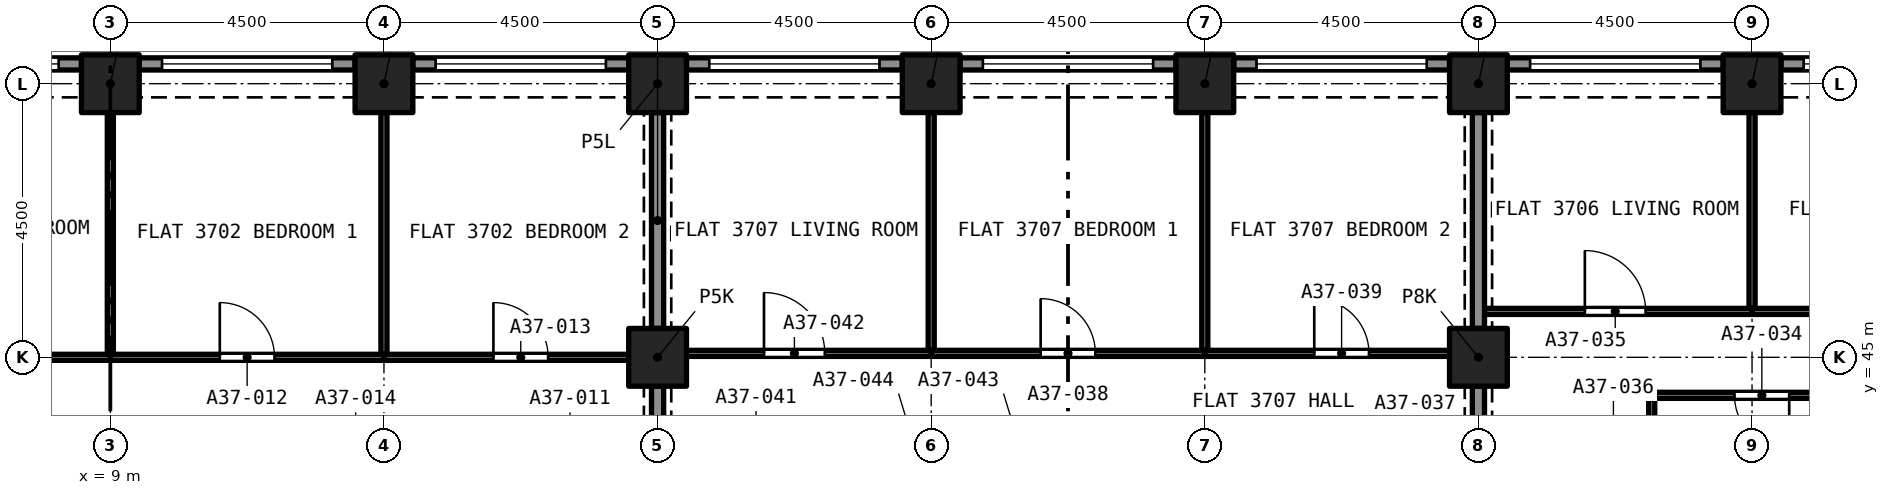
"""IFC4 building model, lengths in metres.
Left out: names, types, materials, properties, quantities, classifications, styles, units other than length and angle.
Written with IfcOpenShell. Run it as: python <this file> out.ifc"""

import sys

from ifc_helpers import new_model, si_unit, direction, frame, frame_2d, origin, origin_2d, place, context, subcontext, project, spatial, rectangle, extrude, element, fill, save


model = new_model("IFC4")
c1 = context("Model", 3, precision=1e-05, world=origin(), true_north=direction((0.0, 1.0)))
c2 = subcontext(c1, "Body", "Model", "MODEL_VIEW")
j1 = project(units=[si_unit("LENGTHUNIT", "METRE"), si_unit("PLANEANGLEUNIT", "RADIAN")], contexts=[c1])
p1 = place(None, origin())
s1 = spatial("IfcSite", under=j1, at=p1, CompositionType="ELEMENT")
p2 = place(p1, origin())
s2 = spatial("IfcBuilding", under=s1, at=p2, CompositionType="ELEMENT")
p3 = place(p2, frame((0.0, 0.0, 133.4)))
s3 = spatial("IfcBuildingStorey", under=s2, at=p3, CompositionType="ELEMENT", Elevation=133.4)
for number, where, z_axis, x_axis in (
    (1, (18.0, 45.0, 0.0), (0.0, 0.0, 1.0), (1.0, 0.0, 0.0)),
    (2, (31.5, 45.0, 0.0), (0.0, 0.0, 1.0), (1.0, 0.0, 0.0)),
    (3, (9.0, 49.5, 0.0), (0.0, 0.0, 1.0), (1.0, 0.0, 0.0)),
    (4, (13.5, 49.5, 0.0), (0.0, 0.0, 1.0), (1.0, 0.0, 0.0)),
    (5, (18.0, 49.5, 0.0), (0.0, 0.0, 1.0), (1.0, 0.0, 0.0)),
    (6, (22.5, 49.5, 0.0), (0.0, 0.0, 1.0), (1.0, 0.0, 0.0)),
    (7, (27.0, 49.5, 0.0), (0.0, 0.0, 1.0), (1.0, 0.0, 0.0)),
    (8, (31.5, 49.5, 0.0), (0.0, 0.0, 1.0), (1.0, 0.0, 0.0)),
    (9, (36.0, 49.5, 0.0), (0.0, 0.0, 1.0), (1.0, 0.0, 0.0)),
):
    element("IfcColumn", number, at=place(p3, frame(where, z_axis=z_axis, x_axis=x_axis)), inside=s3, PredefinedType="COLUMN", context=c2, shape_type="SweptSolid", body=[
        extrude(rectangle(XDim=0.95, YDim=0.95, at=origin_2d()), origin(), (0.0, 0.0, 1.0), 3.2),
    ])
p4 = place(p3, frame((36.475, 49.825, 0.0), z_axis=(0.0, 0.0, 1.0), x_axis=(1.0, 0.0, 0.0)))
e10 = element("IfcWall", 10, at=p4, inside=s3, PredefinedType="SOLIDWALL", context=c2, shape_type="SweptSolid", body=[
    extrude(rectangle(XDim=3.55, YDim=0.2, at=frame_2d((1.775, 0.0))), origin(), (0.0, 0.0, 1.0), 3.2),
])
p5 = place(p4, frame((0.375, 0.0, 0.45)))
e11 = element("IfcOpeningElement", 11, at=p5, cuts=e10, PredefinedType="OPENING", context=c2, shape_type="SweptSolid", body=[
    extrude(rectangle(XDim=2.8, YDim=1.95, at=frame_2d((1.4, 0.975))), frame((0.0, 0.11, 0.0), z_axis=(0.0, -1.0, 0.0), x_axis=(1.0, 0.0, 0.0)), (0.0, 0.0, 1.0), 0.22),
])
p6 = place(p3, frame((31.975, 49.825, 0.0), z_axis=(0.0, 0.0, 1.0), x_axis=(1.0, 0.0, 0.0)))
e12 = element("IfcWall", 12, at=p6, inside=s3, PredefinedType="SOLIDWALL", context=c2, shape_type="SweptSolid", body=[
    extrude(rectangle(XDim=3.55, YDim=0.2, at=frame_2d((1.775, 0.0))), origin(), (0.0, 0.0, 1.0), 3.2),
])
p7 = place(p6, frame((0.375, 0.0, 0.45)))
e13 = element("IfcOpeningElement", 13, at=p7, cuts=e12, PredefinedType="OPENING", context=c2, shape_type="SweptSolid", body=[
    extrude(rectangle(XDim=2.8, YDim=1.95, at=frame_2d((1.4, 0.975))), frame((0.0, 0.11, 0.0), z_axis=(0.0, -1.0, 0.0), x_axis=(1.0, 0.0, 0.0)), (0.0, 0.0, 1.0), 0.22),
])
p8 = place(p3, frame((27.475, 49.825, 0.0), z_axis=(0.0, 0.0, 1.0), x_axis=(1.0, 0.0, 0.0)))
e14 = element("IfcWall", 14, at=p8, inside=s3, PredefinedType="SOLIDWALL", context=c2, shape_type="SweptSolid", body=[
    extrude(rectangle(XDim=3.55, YDim=0.2, at=frame_2d((1.775, 0.0))), origin(), (0.0, 0.0, 1.0), 3.2),
])
p9 = place(p8, frame((0.375, 0.0, 0.45)))
e15 = element("IfcOpeningElement", 15, at=p9, cuts=e14, PredefinedType="OPENING", context=c2, shape_type="SweptSolid", body=[
    extrude(rectangle(XDim=2.8, YDim=1.95, at=frame_2d((1.4, 0.975))), frame((0.0, 0.11, 0.0), z_axis=(0.0, -1.0, 0.0), x_axis=(1.0, 0.0, 0.0)), (0.0, 0.0, 1.0), 0.22),
])
p10 = place(p3, frame((22.975, 49.825, 0.0), z_axis=(0.0, 0.0, 1.0), x_axis=(1.0, 0.0, 0.0)))
e16 = element("IfcWall", 16, at=p10, inside=s3, PredefinedType="SOLIDWALL", context=c2, shape_type="SweptSolid", body=[
    extrude(rectangle(XDim=3.55, YDim=0.2, at=frame_2d((1.775, 0.0))), origin(), (0.0, 0.0, 1.0), 3.2),
])
p11 = place(p10, frame((0.375, 0.0, 0.45)))
e17 = element("IfcOpeningElement", 17, at=p11, cuts=e16, PredefinedType="OPENING", context=c2, shape_type="SweptSolid", body=[
    extrude(rectangle(XDim=2.8, YDim=1.95, at=frame_2d((1.4, 0.975))), frame((0.0, 0.11, 0.0), z_axis=(0.0, -1.0, 0.0), x_axis=(1.0, 0.0, 0.0)), (0.0, 0.0, 1.0), 0.22),
])
p12 = place(p3, frame((18.475, 49.825, 0.0), z_axis=(0.0, 0.0, 1.0), x_axis=(1.0, 0.0, 0.0)))
e18 = element("IfcWall", 18, at=p12, inside=s3, PredefinedType="SOLIDWALL", context=c2, shape_type="SweptSolid", body=[
    extrude(rectangle(XDim=3.55, YDim=0.2, at=frame_2d((1.775, 0.0))), origin(), (0.0, 0.0, 1.0), 3.2),
])
p13 = place(p12, frame((0.375, 0.0, 0.45)))
e19 = element("IfcOpeningElement", 19, at=p13, cuts=e18, PredefinedType="OPENING", context=c2, shape_type="SweptSolid", body=[
    extrude(rectangle(XDim=2.8, YDim=1.95, at=frame_2d((1.4, 0.975))), frame((0.0, 0.11, 0.0), z_axis=(0.0, -1.0, 0.0), x_axis=(1.0, 0.0, 0.0)), (0.0, 0.0, 1.0), 0.22),
])
p14 = place(p3, frame((13.975, 49.825, 0.0), z_axis=(0.0, 0.0, 1.0), x_axis=(1.0, 0.0, 0.0)))
e20 = element("IfcWall", 20, at=p14, inside=s3, PredefinedType="SOLIDWALL", context=c2, shape_type="SweptSolid", body=[
    extrude(rectangle(XDim=3.55, YDim=0.2, at=frame_2d((1.775, 0.0))), origin(), (0.0, 0.0, 1.0), 3.2),
])
p15 = place(p14, frame((0.375, 0.0, 0.45)))
e21 = element("IfcOpeningElement", 21, at=p15, cuts=e20, PredefinedType="OPENING", context=c2, shape_type="SweptSolid", body=[
    extrude(rectangle(XDim=2.8, YDim=1.95, at=frame_2d((1.4, 0.975))), frame((0.0, 0.11, 0.0), z_axis=(0.0, -1.0, 0.0), x_axis=(1.0, 0.0, 0.0)), (0.0, 0.0, 1.0), 0.22),
])
p16 = place(p3, frame((9.475, 49.825, 0.0), z_axis=(0.0, 0.0, 1.0), x_axis=(1.0, 0.0, 0.0)))
e22 = element("IfcWall", 22, at=p16, inside=s3, PredefinedType="SOLIDWALL", context=c2, shape_type="SweptSolid", body=[
    extrude(rectangle(XDim=3.55, YDim=0.2, at=frame_2d((1.775, 0.0))), origin(), (0.0, 0.0, 1.0), 3.2),
])
p17 = place(p16, frame((0.375, 0.0, 0.45)))
e23 = element("IfcOpeningElement", 23, at=p17, cuts=e22, PredefinedType="OPENING", context=c2, shape_type="SweptSolid", body=[
    extrude(rectangle(XDim=2.8, YDim=1.95, at=frame_2d((1.4, 0.975))), frame((0.0, 0.11, 0.0), z_axis=(0.0, -1.0, 0.0), x_axis=(1.0, 0.0, 0.0)), (0.0, 0.0, 1.0), 0.22),
])
p18 = place(p3, frame((4.975, 49.825, 0.0), z_axis=(0.0, 0.0, 1.0), x_axis=(1.0, 0.0, 0.0)))
e24 = element("IfcWall", 24, at=p18, inside=s3, PredefinedType="SOLIDWALL", context=c2, shape_type="SweptSolid", body=[
    extrude(rectangle(XDim=3.55, YDim=0.2, at=frame_2d((1.775, 0.0))), origin(), (0.0, 0.0, 1.0), 3.2),
])
p19 = place(p18, frame((0.375, 0.0, 0.45)))
e25 = element("IfcOpeningElement", 25, at=p19, cuts=e24, PredefinedType="OPENING", context=c2, shape_type="SweptSolid", body=[
    extrude(rectangle(XDim=2.8, YDim=1.95, at=frame_2d((1.4, 0.975))), frame((0.0, 0.11, 0.0), z_axis=(0.0, -1.0, 0.0), x_axis=(1.0, 0.0, 0.0)), (0.0, 0.0, 1.0), 0.22),
])
p20 = place(p3, frame((13.5, 45.05, 0.0), z_axis=(0.0, 0.0, 1.0), x_axis=(0.0, 1.0, 0.0)))
e26 = element("IfcWall", 26, at=p20, inside=s3, PredefinedType="PARTITIONING", context=c2, shape_type="SweptSolid", body=[
    extrude(rectangle(XDim=3.975, YDim=0.1, at=frame_2d((1.987, 0.0))), origin(), (0.0, 0.0, 1.0), 2.9),
])
p21 = place(p3, frame((9.0, 45.0, 0.0), z_axis=(0.0, 0.0, 1.0), x_axis=(1.0, 0.0, 0.0)))
e27 = element("IfcWall", 27, at=p21, inside=s3, PredefinedType="PARTITIONING", context=c2, shape_type="SweptSolid", body=[
    extrude(rectangle(XDim=4.5, YDim=0.1, at=frame_2d((2.25, 0.0))), origin(), (0.0, 0.0, 1.0), 2.9),
])
p22 = place(p21, frame((1.8, 0.0, 0.0)))
e28 = element("IfcOpeningElement", 28, at=p22, cuts=e27, PredefinedType="OPENING", context=c2, shape_type="SweptSolid", body=[
    extrude(rectangle(XDim=0.9, YDim=2.1, at=frame_2d((0.45, 1.05))), frame((0.0, 0.06, 0.0), z_axis=(0.0, -1.0, 0.0), x_axis=(1.0, 0.0, 0.0)), (0.0, 0.0, 1.0), 0.12),
])
p23 = place(p3, frame((9.0, 45.05, 0.0), z_axis=(0.0, 0.0, 1.0), x_axis=(0.0, 1.0, 0.0)))
e29 = element("IfcWall", 29, at=p23, inside=s3, PredefinedType="PARTITIONING", context=c2, shape_type="SweptSolid", body=[
    extrude(rectangle(XDim=3.975, YDim=0.1, at=frame_2d((1.987, 0.0))), origin(), (0.0, 0.0, 1.0), 2.9),
])
p24 = place(p3, frame((13.5, 45.0, 0.0), z_axis=(0.0, 0.0, 1.0), x_axis=(1.0, 0.0, 0.0)))
e30 = element("IfcWall", 30, at=p24, inside=s3, PredefinedType="PARTITIONING", context=c2, shape_type="SweptSolid", body=[
    extrude(rectangle(XDim=4.025, YDim=0.1, at=frame_2d((2.012, 0.0))), origin(), (0.0, 0.0, 1.0), 2.9),
])
p25 = place(p24, frame((1.8, 0.0, 0.0)))
e31 = element("IfcOpeningElement", 31, at=p25, cuts=e30, PredefinedType="OPENING", context=c2, shape_type="SweptSolid", body=[
    extrude(rectangle(XDim=0.9, YDim=2.1, at=frame_2d((0.45, 1.05))), frame((0.0, 0.06, 0.0), z_axis=(0.0, -1.0, 0.0), x_axis=(1.0, 0.0, 0.0)), (0.0, 0.0, 1.0), 0.12),
])
p26 = place(p3, frame((18.0, 45.475, 0.0), z_axis=(0.0, 0.0, 1.0), x_axis=(0.0, 1.0, 0.0)))
e32 = element("IfcWall", 32, at=p26, inside=s3, PredefinedType="PARTITIONING", context=c2, shape_type="SweptSolid", body=[
    extrude(rectangle(XDim=3.55, YDim=0.2, at=frame_2d((1.775, 0.0))), origin(), (0.0, 0.0, 1.0), 2.38),
])
p27 = place(p3, frame((0.514, 45.0, 0.0), z_axis=(0.0, 0.0, 1.0), x_axis=(1.0, 0.0, 0.0)))
e33 = element("IfcWall", 33, at=p27, inside=s3, PredefinedType="PARTITIONING", context=c2, shape_type="SweptSolid", body=[
    extrude(rectangle(XDim=8.486, YDim=0.1, at=frame_2d((4.243, 0.0))), origin(), (0.0, 0.0, 1.0), 2.9),
])
p28 = place(p27, frame((3.423, 0.0, 0.0)))
e34 = element("IfcOpeningElement", 34, at=p28, cuts=e33, PredefinedType="OPENING", context=c2, shape_type="SweptSolid", body=[
    extrude(rectangle(XDim=1.6, YDim=2.1, at=frame_2d((0.8, 1.05))), frame((0.0, 0.06, 0.0), z_axis=(0.0, -1.0, 0.0), x_axis=(1.0, 0.0, 0.0)), (0.0, 0.0, 1.0), 0.12),
])
p29 = place(p3, frame((18.0, 43.595, 0.0), z_axis=(0.0, 0.0, 1.0), x_axis=(0.0, 1.0, 0.0)))
e35 = element("IfcWall", 35, at=p29, inside=s3, PredefinedType="PARTITIONING", context=c2, shape_type="SweptSolid", body=[
    extrude(rectangle(XDim=0.93, YDim=0.2, at=frame_2d((0.465, 0.0))), origin(), (0.0, 0.0, 1.0), 2.38),
])
p30 = place(p3, frame((36.0, 45.755, 0.0), z_axis=(0.0, 0.0, 1.0), x_axis=(1.0, 0.0, 0.0)))
e36 = element("IfcWall", 36, at=p30, inside=s3, PredefinedType="PARTITIONING", context=c2, shape_type="SweptSolid", body=[
    extrude(rectangle(XDim=4.4, YDim=0.1, at=frame_2d((2.2, 0.0))), origin(), (0.0, 0.0, 1.0), 2.9),
])
p31 = place(p30, frame((1.8, 0.0, 0.0)))
e37 = element("IfcOpeningElement", 37, at=p31, cuts=e36, PredefinedType="OPENING", context=c2, shape_type="SweptSolid", body=[
    extrude(rectangle(XDim=0.9, YDim=2.1, at=frame_2d((0.45, 1.05))), frame((0.0, 0.06, 0.0), z_axis=(0.0, -1.0, 0.0), x_axis=(1.0, 0.0, 0.0)), (0.0, 0.0, 1.0), 0.12),
])
p32 = place(p3, frame((36.0, 45.805, 0.0), z_axis=(0.0, 0.0, 1.0), x_axis=(0.0, 1.0, 0.0)))
e38 = element("IfcWall", 38, at=p32, inside=s3, PredefinedType="PARTITIONING", context=c2, shape_type="SweptSolid", body=[
    extrude(rectangle(XDim=3.22, YDim=0.1, at=frame_2d((1.61, 0.0))), origin(), (0.0, 0.0, 1.0), 2.9),
])
p33 = place(p3, frame((37.973, 44.375, 0.0), z_axis=(0.0, 0.0, 1.0), x_axis=(-1.0, 0.0, 0.0)))
e39 = element("IfcWall", 39, at=p33, inside=s3, PredefinedType="PARTITIONING", context=c2, shape_type="SweptSolid", body=[
    extrude(rectangle(XDim=3.673, YDim=0.1, at=frame_2d((1.836, 0.0))), origin(), (0.0, 0.0, 1.0), 2.9),
])
p34 = place(p33, frame((1.361, 0.0, 0.0)))
e40 = element("IfcOpeningElement", 40, at=p34, cuts=e39, PredefinedType="OPENING", context=c2, shape_type="SweptSolid", body=[
    extrude(rectangle(XDim=0.9, YDim=2.1, at=frame_2d((0.45, 1.05))), frame((0.0, 0.06, 0.0), z_axis=(0.0, -1.0, 0.0), x_axis=(1.0, 0.0, 0.0)), (0.0, 0.0, 1.0), 0.12),
])
p35 = place(p3, frame((34.35, 40.325, 0.0), z_axis=(0.0, 0.0, 1.0), x_axis=(0.0, 1.0, 0.0)))
e41 = element("IfcWall", 41, at=p35, inside=s3, PredefinedType="PARTITIONING", context=c2, shape_type="SweptSolid", body=[
    extrude(rectangle(XDim=4.0, YDim=0.1, at=frame_2d((2.0, 0.0))), origin(), (0.0, 0.0, 1.0), 2.9),
])
p36 = place(p3, frame((31.6, 45.755, 0.0), z_axis=(0.0, 0.0, 1.0), x_axis=(1.0, 0.0, 0.0)))
e42 = element("IfcWall", 42, at=p36, inside=s3, PredefinedType="PARTITIONING", context=c2, shape_type="SweptSolid", body=[
    extrude(rectangle(XDim=4.4, YDim=0.1, at=frame_2d((2.2, 0.0))), origin(), (0.0, 0.0, 1.0), 2.9),
])
p37 = place(p36, frame((1.65, 0.0, 0.0)))
e43 = element("IfcOpeningElement", 43, at=p37, cuts=e42, PredefinedType="OPENING", context=c2, shape_type="SweptSolid", body=[
    extrude(rectangle(XDim=1.0, YDim=2.1, at=frame_2d((0.5, 1.05))), frame((0.0, 0.06, 0.0), z_axis=(0.0, -1.0, 0.0), x_axis=(1.0, 0.0, 0.0)), (0.0, 0.0, 1.0), 0.12),
])
for number, where, z_axis, x_axis in (
    (44, (31.5, 40.975, 0.0), (0.0, 0.0, 1.0), (0.0, 1.0, 0.0)),
    (45, (31.5, 45.475, 0.0), (0.0, 0.0, 1.0), (0.0, 1.0, 0.0)),
):
    element("IfcWall", number, at=place(p3, frame(where, z_axis=z_axis, x_axis=x_axis)), inside=s3, PredefinedType="PARTITIONING", context=c2, shape_type="SweptSolid", body=[
        extrude(rectangle(XDim=3.55, YDim=0.2, at=frame_2d((1.775, 0.0))), origin(), (0.0, 0.0, 1.0), 2.38),
    ])
p38 = place(p3, frame((27.0, 45.115, 0.0), z_axis=(0.0, 0.0, 1.0), x_axis=(0.0, 1.0, 0.0)))
e46 = element("IfcWall", 46, at=p38, inside=s3, PredefinedType="PARTITIONING", context=c2, shape_type="SweptSolid", body=[
    extrude(rectangle(XDim=3.91, YDim=0.1, at=frame_2d((1.955, 0.0))), origin(), (0.0, 0.0, 1.0), 2.75),
])
p39 = place(p3, frame((22.5, 45.065, 0.0), z_axis=(0.0, 0.0, 1.0), x_axis=(1.0, 0.0, 0.0)))
e47 = element("IfcWall", 47, at=p39, inside=s3, PredefinedType="PARTITIONING", context=c2, shape_type="SweptSolid", body=[
    extrude(rectangle(XDim=4.5, YDim=0.1, at=frame_2d((2.25, 0.0))), origin(), (0.0, 0.0, 1.0), 2.75),
])
p40 = place(p39, frame((1.8, 0.0, 0.0)))
e48 = element("IfcOpeningElement", 48, at=p40, cuts=e47, PredefinedType="OPENING", context=c2, shape_type="SweptSolid", body=[
    extrude(rectangle(XDim=0.9, YDim=2.1, at=frame_2d((0.45, 1.05))), frame((0.0, 0.06, 0.0), z_axis=(0.0, -1.0, 0.0), x_axis=(1.0, 0.0, 0.0)), (0.0, 0.0, 1.0), 0.12),
])
p41 = place(p3, frame((22.5, 45.115, 0.0), z_axis=(0.0, 0.0, 1.0), x_axis=(0.0, 1.0, 0.0)))
e49 = element("IfcWall", 49, at=p41, inside=s3, PredefinedType="PARTITIONING", context=c2, shape_type="SweptSolid", body=[
    extrude(rectangle(XDim=3.91, YDim=0.1, at=frame_2d((1.955, 0.0))), origin(), (0.0, 0.0, 1.0), 2.75),
])
p42 = place(p3, frame((27.0, 45.065, 0.0), z_axis=(0.0, 0.0, 1.0), x_axis=(1.0, 0.0, 0.0)))
e50 = element("IfcWall", 50, at=p42, inside=s3, PredefinedType="PARTITIONING", context=c2, shape_type="SweptSolid", body=[
    extrude(rectangle(XDim=4.025, YDim=0.1, at=frame_2d((2.012, 0.0))), origin(), (0.0, 0.0, 1.0), 2.75),
])
p43 = place(p42, frame((1.8, 0.0, 0.0)))
e51 = element("IfcOpeningElement", 51, at=p43, cuts=e50, PredefinedType="OPENING", context=c2, shape_type="SweptSolid", body=[
    extrude(rectangle(XDim=0.9, YDim=2.1, at=frame_2d((0.45, 1.05))), frame((0.0, 0.06, 0.0), z_axis=(0.0, -1.0, 0.0), x_axis=(1.0, 0.0, 0.0)), (0.0, 0.0, 1.0), 0.12),
])
p44 = place(p3, frame((18.475, 45.065, 0.0), z_axis=(0.0, 0.0, 1.0), x_axis=(1.0, 0.0, 0.0)))
e52 = element("IfcWall", 52, at=p44, inside=s3, PredefinedType="PARTITIONING", context=c2, shape_type="SweptSolid", body=[
    extrude(rectangle(XDim=4.025, YDim=0.1, at=frame_2d((2.012, 0.0))), origin(), (0.0, 0.0, 1.0), 2.75),
])
p45 = place(p44, frame((1.275, 0.0, 0.0)))
e53 = element("IfcOpeningElement", 53, at=p45, cuts=e52, PredefinedType="OPENING", context=c2, shape_type="SweptSolid", body=[
    extrude(rectangle(XDim=1.0, YDim=2.1, at=frame_2d((0.5, 1.05))), frame((0.0, 0.06, 0.0), z_axis=(0.0, -1.0, 0.0), x_axis=(1.0, 0.0, 0.0)), (0.0, 0.0, 1.0), 0.12),
])
p46 = place(p5, origin())
e54 = element("IfcWindow", 54, at=p46, inside=s3, PartitioningType="SINGLE_PANEL", PredefinedType="WINDOW", context=c2, shape_type="SweptSolid", body=[
    extrude(rectangle(XDim=2.8, YDim=1.95, at=frame_2d((1.4, 0.975))), frame((0.0, 0.03, 0.0), z_axis=(0.0, -1.0, 0.0), x_axis=(1.0, 0.0, 0.0)), (0.0, 0.0, 1.0), 0.06),
])
fill(e11, e54)
p47 = place(p7, origin())
e55 = element("IfcWindow", 55, at=p47, inside=s3, PartitioningType="SINGLE_PANEL", PredefinedType="WINDOW", context=c2, shape_type="SweptSolid", body=[
    extrude(rectangle(XDim=2.8, YDim=1.95, at=frame_2d((1.4, 0.975))), frame((0.0, 0.03, 0.0), z_axis=(0.0, -1.0, 0.0), x_axis=(1.0, 0.0, 0.0)), (0.0, 0.0, 1.0), 0.06),
])
fill(e13, e55)
p48 = place(p9, origin())
e56 = element("IfcWindow", 56, at=p48, inside=s3, PartitioningType="SINGLE_PANEL", PredefinedType="WINDOW", context=c2, shape_type="SweptSolid", body=[
    extrude(rectangle(XDim=2.8, YDim=1.95, at=frame_2d((1.4, 0.975))), frame((0.0, 0.03, 0.0), z_axis=(0.0, -1.0, 0.0), x_axis=(1.0, 0.0, 0.0)), (0.0, 0.0, 1.0), 0.06),
])
fill(e15, e56)
p49 = place(p11, origin())
e57 = element("IfcWindow", 57, at=p49, inside=s3, PartitioningType="SINGLE_PANEL", PredefinedType="WINDOW", context=c2, shape_type="SweptSolid", body=[
    extrude(rectangle(XDim=2.8, YDim=1.95, at=frame_2d((1.4, 0.975))), frame((0.0, 0.03, 0.0), z_axis=(0.0, -1.0, 0.0), x_axis=(1.0, 0.0, 0.0)), (0.0, 0.0, 1.0), 0.06),
])
fill(e17, e57)
p50 = place(p13, origin())
e58 = element("IfcWindow", 58, at=p50, inside=s3, PartitioningType="SINGLE_PANEL", PredefinedType="WINDOW", context=c2, shape_type="SweptSolid", body=[
    extrude(rectangle(XDim=2.8, YDim=1.95, at=frame_2d((1.4, 0.975))), frame((0.0, 0.03, 0.0), z_axis=(0.0, -1.0, 0.0), x_axis=(1.0, 0.0, 0.0)), (0.0, 0.0, 1.0), 0.06),
])
fill(e19, e58)
p51 = place(p15, origin())
e59 = element("IfcWindow", 59, at=p51, inside=s3, PartitioningType="SINGLE_PANEL", PredefinedType="WINDOW", context=c2, shape_type="SweptSolid", body=[
    extrude(rectangle(XDim=2.8, YDim=1.95, at=frame_2d((1.4, 0.975))), frame((0.0, 0.03, 0.0), z_axis=(0.0, -1.0, 0.0), x_axis=(1.0, 0.0, 0.0)), (0.0, 0.0, 1.0), 0.06),
])
fill(e21, e59)
p52 = place(p17, origin())
e60 = element("IfcWindow", 60, at=p52, inside=s3, PartitioningType="SINGLE_PANEL", PredefinedType="WINDOW", context=c2, shape_type="SweptSolid", body=[
    extrude(rectangle(XDim=2.8, YDim=1.95, at=frame_2d((1.4, 0.975))), frame((0.0, 0.03, 0.0), z_axis=(0.0, -1.0, 0.0), x_axis=(1.0, 0.0, 0.0)), (0.0, 0.0, 1.0), 0.06),
])
fill(e23, e60)
p53 = place(p19, origin())
e61 = element("IfcWindow", 61, at=p53, inside=s3, PartitioningType="SINGLE_PANEL", PredefinedType="WINDOW", context=c2, shape_type="SweptSolid", body=[
    extrude(rectangle(XDim=2.8, YDim=1.95, at=frame_2d((1.4, 0.975))), frame((0.0, 0.03, 0.0), z_axis=(0.0, -1.0, 0.0), x_axis=(1.0, 0.0, 0.0)), (0.0, 0.0, 1.0), 0.06),
])
fill(e25, e61)
p54 = place(p22, origin())
e62 = element("IfcDoor", 62, at=p54, inside=s3, OperationType="SINGLE_SWING_LEFT", PredefinedType="DOOR", context=c2, shape_type="SweptSolid", body=[
    extrude(rectangle(XDim=0.9, YDim=2.1, at=frame_2d((0.45, 1.05))), frame((0.0, 0.025, 0.0), z_axis=(0.0, -1.0, 0.0), x_axis=(1.0, 0.0, 0.0)), (0.0, 0.0, 1.0), 0.05),
])
fill(e28, e62)
p55 = place(p25, origin())
e63 = element("IfcDoor", 63, at=p55, inside=s3, OperationType="SINGLE_SWING_RIGHT", PredefinedType="DOOR", context=c2, shape_type="SweptSolid", body=[
    extrude(rectangle(XDim=0.9, YDim=2.1, at=frame_2d((0.45, 1.05))), frame((0.0, 0.025, 0.0), z_axis=(0.0, -1.0, 0.0), x_axis=(1.0, 0.0, 0.0)), (0.0, 0.0, 1.0), 0.05),
])
fill(e31, e63)
p56 = place(p34, origin())
e64 = element("IfcDoor", 64, at=p56, inside=s3, OperationType="SINGLE_SWING_LEFT", PredefinedType="DOOR", context=c2, shape_type="SweptSolid", body=[
    extrude(rectangle(XDim=0.9, YDim=2.1, at=frame_2d((0.45, 1.05))), frame((0.0, 0.025, 0.0), z_axis=(0.0, -1.0, 0.0), x_axis=(1.0, 0.0, 0.0)), (0.0, 0.0, 1.0), 0.05),
])
fill(e40, e64)
p57 = place(p37, origin())
e65 = element("IfcDoor", 65, at=p57, inside=s3, OperationType="SINGLE_SWING_LEFT", PredefinedType="DOOR", context=c2, shape_type="SweptSolid", body=[
    extrude(rectangle(XDim=1.0, YDim=2.1, at=frame_2d((0.5, 1.05))), frame((0.0, 0.025, 0.0), z_axis=(0.0, -1.0, 0.0), x_axis=(1.0, 0.0, 0.0)), (0.0, 0.0, 1.0), 0.05),
])
fill(e43, e65)
p58 = place(p40, origin())
e66 = element("IfcDoor", 66, at=p58, inside=s3, OperationType="SINGLE_SWING_LEFT", PredefinedType="DOOR", context=c2, shape_type="SweptSolid", body=[
    extrude(rectangle(XDim=0.9, YDim=2.1, at=frame_2d((0.45, 1.05))), frame((0.0, 0.025, 0.0), z_axis=(0.0, -1.0, 0.0), x_axis=(1.0, 0.0, 0.0)), (0.0, 0.0, 1.0), 0.05),
])
fill(e48, e66)
p59 = place(p43, origin())
e67 = element("IfcDoor", 67, at=p59, inside=s3, OperationType="SINGLE_SWING_RIGHT", PredefinedType="DOOR", context=c2, shape_type="SweptSolid", body=[
    extrude(rectangle(XDim=0.9, YDim=2.1, at=frame_2d((0.45, 1.05))), frame((0.0, 0.025, 0.0), z_axis=(0.0, -1.0, 0.0), x_axis=(1.0, 0.0, 0.0)), (0.0, 0.0, 1.0), 0.05),
])
fill(e51, e67)
p60 = place(p45, origin())
e68 = element("IfcDoor", 68, at=p60, inside=s3, OperationType="SINGLE_SWING_LEFT", PredefinedType="DOOR", context=c2, shape_type="SweptSolid", body=[
    extrude(rectangle(XDim=1.0, YDim=2.1, at=frame_2d((0.5, 1.05))), frame((0.0, 0.025, 0.0), z_axis=(0.0, -1.0, 0.0), x_axis=(1.0, 0.0, 0.0)), (0.0, 0.0, 1.0), 0.05),
])
fill(e53, e68)
save(model, sys.argv[1])
